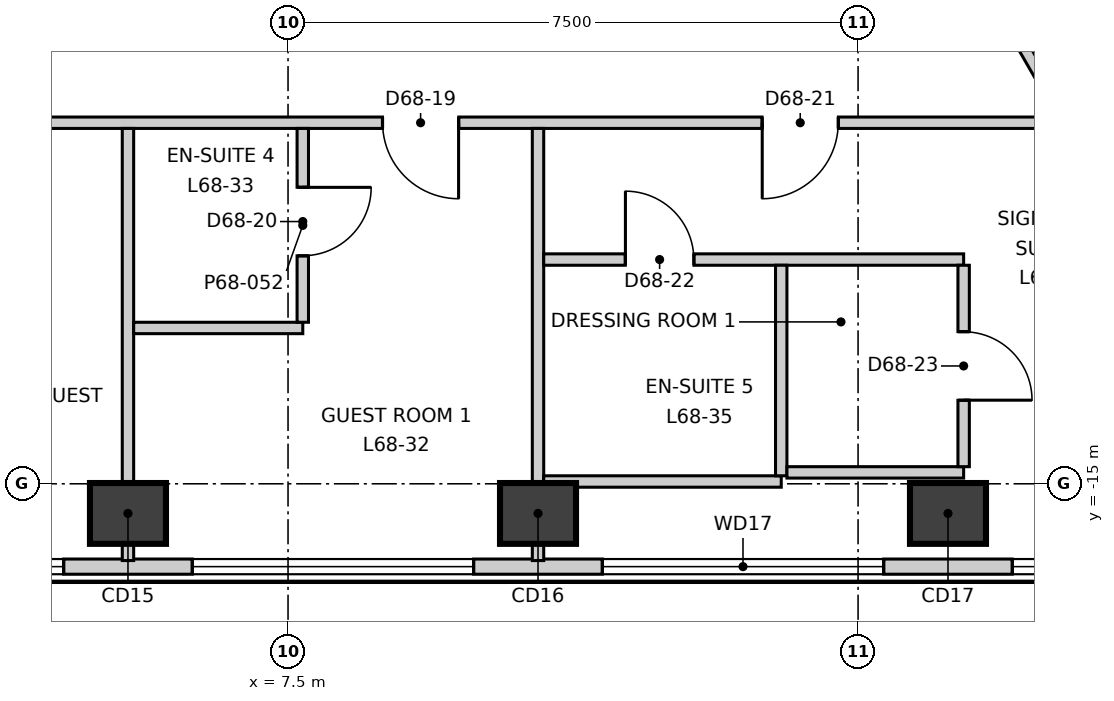
"""IFC4 building model, lengths in metres.
Left out: names, types, materials, properties, quantities, classifications, styles, units other than length and angle.
Written with IfcOpenShell. Run it as: python <this file> out.ifc"""

import sys

from ifc_helpers import new_model, si_unit, direction, frame, frame_2d, origin, origin_2d, place, context, subcontext, project, spatial, rectangle, extrude, element, fill, save


model = new_model("IFC4")
c1 = context("Model", 3, precision=1e-05, world=origin(), true_north=direction((0.0, 1.0)))
c2 = subcontext(c1, "Body", "Model", "MODEL_VIEW")
j1 = project(units=[si_unit("LENGTHUNIT", "METRE"), si_unit("PLANEANGLEUNIT", "RADIAN")], contexts=[c1])
p1 = place(None, origin())
s1 = spatial("IfcSite", under=j1, at=p1, CompositionType="ELEMENT")
p2 = place(p1, origin())
s2 = spatial("IfcBuilding", under=s1, at=p2, CompositionType="ELEMENT")
p3 = place(p2, frame((0.0, 0.0, 289.9)))
s3 = spatial("IfcBuildingStorey", under=s2, at=p3, CompositionType="ELEMENT", Elevation=289.9)
for number, where, z_axis, x_axis in (
    (1, (5.394, -15.39, -0.3), (0.0, 0.0, 1.0), (1.0, 0.0, 0.0)),
    (2, (10.789, -15.39, -0.3), (0.0, 0.0, 1.0), (1.0, 0.0, 0.0)),
    (3, (16.183, -15.39, -0.3), (0.0, 0.0, 1.0), (1.0, 0.0, 0.0)),
):
    element("IfcColumn", number, at=place(p3, frame(where, z_axis=z_axis, x_axis=x_axis)), inside=s3, PredefinedType="COLUMN", context=c2, shape_type="SweptSolid", body=[
        extrude(rectangle(XDim=1.0, YDim=0.8, at=origin_2d()), origin(), (0.0, 0.0, 1.0), 3.6),
    ])
p4 = place(p3, frame((-22.88, -16.09, 0.0), z_axis=(0.0, 0.0, 1.0), x_axis=(1.0, 0.0, 0.0)))
e4 = element("IfcWall", 4, at=p4, inside=s3, PredefinedType="ELEMENTEDWALL", context=c2, shape_type="SweptSolid", body=[
    extrude(rectangle(XDim=45.74, YDim=0.2, at=frame_2d((22.87, 0.0))), origin(), (0.0, 0.0, 1.0), 3.3),
])
p5 = place(p4, frame((2.15, 0.0, 0.9)))
e5 = element("IfcOpeningElement", 5, at=p5, cuts=e4, PredefinedType="OPENING", context=c2, shape_type="SweptSolid", body=[
    extrude(rectangle(XDim=3.7, YDim=2.2, at=frame_2d((1.85, 1.1))), frame((0.0, 0.11, 0.0), z_axis=(0.0, -1.0, 0.0), x_axis=(1.0, 0.0, 0.0)), (0.0, 0.0, 1.0), 0.22),
])
p6 = place(p4, frame((7.544, 0.0, 0.9)))
e6 = element("IfcOpeningElement", 6, at=p6, cuts=e4, PredefinedType="OPENING", context=c2, shape_type="SweptSolid", body=[
    extrude(rectangle(XDim=3.7, YDim=2.2, at=frame_2d((1.85, 1.1))), frame((0.0, 0.11, 0.0), z_axis=(0.0, -1.0, 0.0), x_axis=(1.0, 0.0, 0.0)), (0.0, 0.0, 1.0), 0.22),
])
p7 = place(p4, frame((12.939, 0.0, 0.9)))
e7 = element("IfcOpeningElement", 7, at=p7, cuts=e4, PredefinedType="OPENING", context=c2, shape_type="SweptSolid", body=[
    extrude(rectangle(XDim=3.7, YDim=2.2, at=frame_2d((1.85, 1.1))), frame((0.0, 0.11, 0.0), z_axis=(0.0, -1.0, 0.0), x_axis=(1.0, 0.0, 0.0)), (0.0, 0.0, 1.0), 0.22),
])
p8 = place(p4, frame((18.333, 0.0, 0.9)))
e8 = element("IfcOpeningElement", 8, at=p8, cuts=e4, PredefinedType="OPENING", context=c2, shape_type="SweptSolid", body=[
    extrude(rectangle(XDim=3.7, YDim=2.2, at=frame_2d((1.85, 1.1))), frame((0.0, 0.11, 0.0), z_axis=(0.0, -1.0, 0.0), x_axis=(1.0, 0.0, 0.0)), (0.0, 0.0, 1.0), 0.22),
])
p9 = place(p4, frame((23.727, 0.0, 0.9)))
e9 = element("IfcOpeningElement", 9, at=p9, cuts=e4, PredefinedType="OPENING", context=c2, shape_type="SweptSolid", body=[
    extrude(rectangle(XDim=3.7, YDim=2.2, at=frame_2d((1.85, 1.1))), frame((0.0, 0.11, 0.0), z_axis=(0.0, -1.0, 0.0), x_axis=(1.0, 0.0, 0.0)), (0.0, 0.0, 1.0), 0.22),
])
p10 = place(p4, frame((29.121, 0.0, 0.9)))
e10 = element("IfcOpeningElement", 10, at=p10, cuts=e4, PredefinedType="OPENING", context=c2, shape_type="SweptSolid", body=[
    extrude(rectangle(XDim=3.7, YDim=2.2, at=frame_2d((1.85, 1.1))), frame((0.0, 0.11, 0.0), z_axis=(0.0, -1.0, 0.0), x_axis=(1.0, 0.0, 0.0)), (0.0, 0.0, 1.0), 0.22),
])
p11 = place(p4, frame((34.516, 0.0, 0.9)))
e11 = element("IfcOpeningElement", 11, at=p11, cuts=e4, PredefinedType="OPENING", context=c2, shape_type="SweptSolid", body=[
    extrude(rectangle(XDim=3.7, YDim=2.2, at=frame_2d((1.85, 1.1))), frame((0.0, 0.11, 0.0), z_axis=(0.0, -1.0, 0.0), x_axis=(1.0, 0.0, 0.0)), (0.0, 0.0, 1.0), 0.22),
])
p12 = place(p4, frame((39.91, 0.0, 0.9)))
e12 = element("IfcOpeningElement", 12, at=p12, cuts=e4, PredefinedType="OPENING", context=c2, shape_type="SweptSolid", body=[
    extrude(rectangle(XDim=3.7, YDim=2.2, at=frame_2d((1.85, 1.1))), frame((0.0, 0.11, 0.0), z_axis=(0.0, -1.0, 0.0), x_axis=(1.0, 0.0, 0.0)), (0.0, 0.0, 1.0), 0.22),
])
p13 = place(p3, frame((25.375, -11.77, 0.0), z_axis=(0.0, 0.0, 1.0), x_axis=(-0.500008134474, 0.866020707292, 0.0)))
e13 = element("IfcWall", 13, at=p13, inside=s3, PredefinedType="ELEMENTEDWALL", context=c2, shape_type="SweptSolid", body=[
    extrude(rectangle(XDim=45.741, YDim=0.2, at=frame_2d((22.871, 0.0))), origin(), (0.0, 0.0, 1.0), 3.3),
])
p14 = place(p13, frame((2.15, 0.0, 0.9)))
e14 = element("IfcOpeningElement", 14, at=p14, cuts=e13, PredefinedType="OPENING", context=c2, shape_type="SweptSolid", body=[
    extrude(rectangle(XDim=3.7, YDim=2.2, at=frame_2d((1.85, 1.1))), frame((0.0, 0.11, 0.0), z_axis=(0.0, -1.0, 0.0), x_axis=(1.0, 0.0, 0.0)), (0.0, 0.0, 1.0), 0.22),
])
p15 = place(p13, frame((7.544, 0.0, 0.9)))
e15 = element("IfcOpeningElement", 15, at=p15, cuts=e13, PredefinedType="OPENING", context=c2, shape_type="SweptSolid", body=[
    extrude(rectangle(XDim=3.7, YDim=2.2, at=frame_2d((1.85, 1.1))), frame((0.0, 0.11, 0.0), z_axis=(0.0, -1.0, 0.0), x_axis=(1.0, 0.0, 0.0)), (0.0, 0.0, 1.0), 0.22),
])
p16 = place(p13, frame((12.939, 0.0, 0.9)))
e16 = element("IfcOpeningElement", 16, at=p16, cuts=e13, PredefinedType="OPENING", context=c2, shape_type="SweptSolid", body=[
    extrude(rectangle(XDim=3.7, YDim=2.2, at=frame_2d((1.85, 1.1))), frame((0.0, 0.11, 0.0), z_axis=(0.0, -1.0, 0.0), x_axis=(1.0, 0.0, 0.0)), (0.0, 0.0, 1.0), 0.22),
])
p17 = place(p13, frame((18.333, 0.0, 0.9)))
e17 = element("IfcOpeningElement", 17, at=p17, cuts=e13, PredefinedType="OPENING", context=c2, shape_type="SweptSolid", body=[
    extrude(rectangle(XDim=3.7, YDim=2.2, at=frame_2d((1.85, 1.1))), frame((0.0, 0.11, 0.0), z_axis=(0.0, -1.0, 0.0), x_axis=(1.0, 0.0, 0.0)), (0.0, 0.0, 1.0), 0.22),
])
p18 = place(p13, frame((23.728, 0.0, 0.9)))
e18 = element("IfcOpeningElement", 18, at=p18, cuts=e13, PredefinedType="OPENING", context=c2, shape_type="SweptSolid", body=[
    extrude(rectangle(XDim=3.7, YDim=2.2, at=frame_2d((1.85, 1.1))), frame((0.0, 0.11, 0.0), z_axis=(0.0, -1.0, 0.0), x_axis=(1.0, 0.0, 0.0)), (0.0, 0.0, 1.0), 0.22),
])
p19 = place(p13, frame((29.122, 0.0, 0.9)))
e19 = element("IfcOpeningElement", 19, at=p19, cuts=e13, PredefinedType="OPENING", context=c2, shape_type="SweptSolid", body=[
    extrude(rectangle(XDim=3.7, YDim=2.2, at=frame_2d((1.85, 1.1))), frame((0.0, 0.11, 0.0), z_axis=(0.0, -1.0, 0.0), x_axis=(1.0, 0.0, 0.0)), (0.0, 0.0, 1.0), 0.22),
])
p20 = place(p13, frame((34.517, 0.0, 0.9)))
e20 = element("IfcOpeningElement", 20, at=p20, cuts=e13, PredefinedType="OPENING", context=c2, shape_type="SweptSolid", body=[
    extrude(rectangle(XDim=3.7, YDim=2.2, at=frame_2d((1.85, 1.1))), frame((0.0, 0.11, 0.0), z_axis=(0.0, -1.0, 0.0), x_axis=(1.0, 0.0, 0.0)), (0.0, 0.0, 1.0), 0.22),
])
p21 = place(p13, frame((39.911, 0.0, 0.9)))
e21 = element("IfcOpeningElement", 21, at=p21, cuts=e13, PredefinedType="OPENING", context=c2, shape_type="SweptSolid", body=[
    extrude(rectangle(XDim=3.7, YDim=2.2, at=frame_2d((1.85, 1.1))), frame((0.0, 0.11, 0.0), z_axis=(0.0, -1.0, 0.0), x_axis=(1.0, 0.0, 0.0)), (0.0, 0.0, 1.0), 0.22),
])
p22 = place(p3, frame((-17.603, -10.25, 0.0), z_axis=(0.0, 0.0, 1.0), x_axis=(1.0, 0.0, 0.0)))
e22 = element("IfcWall", 22, at=p22, inside=s3, PredefinedType="PARTITIONING", context=c2, shape_type="SweptSolid", body=[
    extrude(rectangle(XDim=35.356, YDim=0.15, at=frame_2d((17.678, 0.0))), origin(), (0.0, 0.0, 1.0), 3.3),
])
p23 = place(p22, frame((2.8, 0.0, 0.0)))
e23 = element("IfcOpeningElement", 23, at=p23, cuts=e22, PredefinedType="OPENING", context=c2, shape_type="SweptSolid", body=[
    extrude(rectangle(XDim=1.0, YDim=2.1, at=frame_2d((0.5, 1.05))), frame((0.0, 0.085, 0.0), z_axis=(0.0, -1.0, 0.0), x_axis=(1.0, 0.0, 0.0)), (0.0, 0.0, 1.0), 0.17),
])
p24 = place(p22, frame((15.065, 0.0, 0.0)))
e24 = element("IfcOpeningElement", 24, at=p24, cuts=e22, PredefinedType="OPENING", context=c2, shape_type="SweptSolid", body=[
    extrude(rectangle(XDim=1.0, YDim=2.1, at=frame_2d((0.5, 1.05))), frame((0.0, 0.085, 0.0), z_axis=(0.0, -1.0, 0.0), x_axis=(1.0, 0.0, 0.0)), (0.0, 0.0, 1.0), 0.17),
])
p25 = place(p22, frame((9.765, 0.0, 0.0)))
e25 = element("IfcOpeningElement", 25, at=p25, cuts=e22, PredefinedType="OPENING", context=c2, shape_type="SweptSolid", body=[
    extrude(rectangle(XDim=0.9, YDim=2.1, at=frame_2d((0.45, 1.05))), frame((0.0, 0.085, 0.0), z_axis=(0.0, -1.0, 0.0), x_axis=(1.0, 0.0, 0.0)), (0.0, 0.0, 1.0), 0.17),
])
p26 = place(p22, frame((11.965, 0.0, 0.0)))
e26 = element("IfcOpeningElement", 26, at=p26, cuts=e22, PredefinedType="OPENING", context=c2, shape_type="SweptSolid", body=[
    extrude(rectangle(XDim=0.9, YDim=2.1, at=frame_2d((0.45, 1.05))), frame((0.0, 0.085, 0.0), z_axis=(0.0, -1.0, 0.0), x_axis=(1.0, 0.0, 0.0)), (0.0, 0.0, 1.0), 0.17),
])
p27 = place(p22, frame((20.953, 0.0, 0.0)))
e27 = element("IfcOpeningElement", 27, at=p27, cuts=e22, PredefinedType="OPENING", context=c2, shape_type="SweptSolid", body=[
    extrude(rectangle(XDim=1.0, YDim=2.1, at=frame_2d((0.5, 1.05))), frame((0.0, 0.085, 0.0), z_axis=(0.0, -1.0, 0.0), x_axis=(1.0, 0.0, 0.0)), (0.0, 0.0, 1.0), 0.17),
])
p28 = place(p22, frame((26.347, 0.0, 0.0)))
e28 = element("IfcOpeningElement", 28, at=p28, cuts=e22, PredefinedType="OPENING", context=c2, shape_type="SweptSolid", body=[
    extrude(rectangle(XDim=1.0, YDim=2.1, at=frame_2d((0.5, 1.05))), frame((0.0, 0.085, 0.0), z_axis=(0.0, -1.0, 0.0), x_axis=(1.0, 0.0, 0.0)), (0.0, 0.0, 1.0), 0.17),
])
p29 = place(p22, frame((31.342, 0.0, 0.0)))
e29 = element("IfcOpeningElement", 29, at=p29, cuts=e22, PredefinedType="OPENING", context=c2, shape_type="SweptSolid", body=[
    extrude(rectangle(XDim=1.0, YDim=2.1, at=frame_2d((0.5, 1.05))), frame((0.0, 0.085, 0.0), z_axis=(0.0, -1.0, 0.0), x_axis=(1.0, 0.0, 0.0)), (0.0, 0.0, 1.0), 0.17),
])
p30 = place(p3, frame((0.075, 20.37, 0.0), z_axis=(0.0, 0.0, 1.0), x_axis=(0.500009775255, -0.866019759965, 0.0)))
e30 = element("IfcWall", 30, at=p30, inside=s3, PredefinedType="PARTITIONING", context=c2, shape_type="SweptSolid", body=[
    extrude(rectangle(XDim=35.207, YDim=0.15, at=frame_2d((17.604, 0.0))), origin(), (0.0, 0.0, 1.0), 3.3),
])
p31 = place(p30, frame((31.407, 0.0, 0.0)))
e31 = element("IfcOpeningElement", 31, at=p31, cuts=e30, PredefinedType="OPENING", context=c2, shape_type="SweptSolid", body=[
    extrude(rectangle(XDim=1.0, YDim=2.1, at=frame_2d((0.5, 1.05))), frame((0.0, 0.085, 0.0), z_axis=(0.0, -1.0, 0.0), x_axis=(1.0, 0.0, 0.0)), (0.0, 0.0, 1.0), 0.17),
])
p32 = place(p30, frame((19.243, 0.0, 0.0)))
e32 = element("IfcOpeningElement", 32, at=p32, cuts=e30, PredefinedType="OPENING", context=c2, shape_type="SweptSolid", body=[
    extrude(rectangle(XDim=1.0, YDim=2.1, at=frame_2d((0.5, 1.05))), frame((0.0, 0.085, 0.0), z_axis=(0.0, -1.0, 0.0), x_axis=(1.0, 0.0, 0.0)), (0.0, 0.0, 1.0), 0.17),
])
p33 = place(p30, frame((24.543, 0.0, 0.0)))
e33 = element("IfcOpeningElement", 33, at=p33, cuts=e30, PredefinedType="OPENING", context=c2, shape_type="SweptSolid", body=[
    extrude(rectangle(XDim=0.9, YDim=2.1, at=frame_2d((0.45, 1.05))), frame((0.0, 0.085, 0.0), z_axis=(0.0, -1.0, 0.0), x_axis=(1.0, 0.0, 0.0)), (0.0, 0.0, 1.0), 0.17),
])
p34 = place(p30, frame((22.443, 0.0, 0.0)))
e34 = element("IfcOpeningElement", 34, at=p34, cuts=e30, PredefinedType="OPENING", context=c2, shape_type="SweptSolid", body=[
    extrude(rectangle(XDim=0.9, YDim=2.1, at=frame_2d((0.45, 1.05))), frame((0.0, 0.085, 0.0), z_axis=(0.0, -1.0, 0.0), x_axis=(1.0, 0.0, 0.0)), (0.0, 0.0, 1.0), 0.17),
])
p35 = place(p30, frame((13.253, 0.0, 0.0)))
e35 = element("IfcOpeningElement", 35, at=p35, cuts=e30, PredefinedType="OPENING", context=c2, shape_type="SweptSolid", body=[
    extrude(rectangle(XDim=1.0, YDim=2.1, at=frame_2d((0.5, 1.05))), frame((0.0, 0.085, 0.0), z_axis=(0.0, -1.0, 0.0), x_axis=(1.0, 0.0, 0.0)), (0.0, 0.0, 1.0), 0.17),
])
p36 = place(p30, frame((5.559, 0.0, 0.0)))
e36 = element("IfcOpeningElement", 36, at=p36, cuts=e30, PredefinedType="OPENING", context=c2, shape_type="SweptSolid", body=[
    extrude(rectangle(XDim=1.0, YDim=2.1, at=frame_2d((0.5, 1.05))), frame((0.0, 0.085, 0.0), z_axis=(0.0, -1.0, 0.0), x_axis=(1.0, 0.0, 0.0)), (0.0, 0.0, 1.0), 0.17),
])
for number, where, z_axis, x_axis in (
    (37, (5.394, -16.01, 0.0), (0.0, 0.0, 1.0), (0.0, 1.0, 0.0)),
    (38, (10.789, -16.01, 0.0), (0.0, 0.0, 1.0), (0.0, 1.0, 0.0)),
):
    element("IfcWall", number, at=place(p3, frame(where, z_axis=z_axis, x_axis=x_axis)), inside=s3, PredefinedType="PARTITIONING", context=c2, shape_type="SweptSolid", body=[
        extrude(rectangle(XDim=5.685, YDim=0.15, at=frame_2d((2.843, 0.0))), origin(), (0.0, 0.0, 1.0), 3.3),
    ])
p37 = place(p3, frame((10.864, -12.05, 0.0), z_axis=(0.0, 0.0, 1.0), x_axis=(1.0, 0.0, 0.0)))
e39 = element("IfcWall", 39, at=p37, inside=s3, PredefinedType="PARTITIONING", context=c2, shape_type="SweptSolid", body=[
    extrude(rectangle(XDim=5.525, YDim=0.15, at=frame_2d((2.762, 0.0))), origin(), (0.0, 0.0, 1.0), 3.3),
])
p38 = place(p37, frame((1.075, 0.0, 0.0)))
e40 = element("IfcOpeningElement", 40, at=p38, cuts=e39, PredefinedType="OPENING", context=c2, shape_type="SweptSolid", body=[
    extrude(rectangle(XDim=0.9, YDim=2.1, at=frame_2d((0.45, 1.05))), frame((0.0, 0.085, 0.0), z_axis=(0.0, -1.0, 0.0), x_axis=(1.0, 0.0, 0.0)), (0.0, 0.0, 1.0), 0.17),
])
p39 = place(p3, frame((10.864, -14.97, 0.0), z_axis=(0.0, 0.0, 1.0), x_axis=(1.0, 0.0, 0.0)))
e41 = element("IfcWall", 41, at=p39, inside=s3, PredefinedType="PARTITIONING", context=c2, shape_type="SweptSolid", body=[
    extrude(rectangle(XDim=3.125, YDim=0.15, at=frame_2d((1.562, 0.0))), origin(), (0.0, 0.0, 1.0), 2.6),
])
p40 = place(p3, frame((5.469, -12.95, 0.0), z_axis=(0.0, 0.0, 1.0), x_axis=(1.0, 0.0, 0.0)))
e42 = element("IfcWall", 42, at=p40, inside=s3, PredefinedType="PARTITIONING", context=c2, shape_type="SweptSolid", body=[
    extrude(rectangle(XDim=2.225, YDim=0.15, at=frame_2d((1.113, 0.0))), origin(), (0.0, 0.0, 1.0), 3.3),
])
p41 = place(p3, frame((7.694, -12.875, 0.0), z_axis=(0.0, 0.0, 1.0), x_axis=(0.0, 1.0, 0.0)))
e43 = element("IfcWall", 43, at=p41, inside=s3, PredefinedType="PARTITIONING", context=c2, shape_type="SweptSolid", body=[
    extrude(rectangle(XDim=2.55, YDim=0.15, at=frame_2d((1.275, 0.0))), origin(), (0.0, 0.0, 1.0), 3.3),
])
p42 = place(p41, frame((0.875, 0.0, 0.0)))
e44 = element("IfcOpeningElement", 44, at=p42, cuts=e43, PredefinedType="OPENING", context=c2, shape_type="SweptSolid", body=[
    extrude(rectangle(XDim=0.9, YDim=2.1, at=frame_2d((0.45, 1.05))), frame((0.0, 0.085, 0.0), z_axis=(0.0, -1.0, 0.0), x_axis=(1.0, 0.0, 0.0)), (0.0, 0.0, 1.0), 0.17),
])
p43 = place(p3, frame((13.989, -14.895, 0.0), z_axis=(0.0, 0.0, 1.0), x_axis=(0.0, 1.0, 0.0)))
e45 = element("IfcWall", 45, at=p43, inside=s3, PredefinedType="PARTITIONING", context=c2, shape_type="SweptSolid", body=[
    extrude(rectangle(XDim=2.77, YDim=0.15, at=frame_2d((1.385, 0.0))), origin(), (0.0, 0.0, 1.0), 3.3),
])
p44 = place(p3, frame((14.064, -14.85, 0.0), z_axis=(0.0, 0.0, 1.0), x_axis=(1.0, 0.0, 0.0)))
e46 = element("IfcWall", 46, at=p44, inside=s3, PredefinedType="PARTITIONING", context=c2, shape_type="SweptSolid", body=[
    extrude(rectangle(XDim=2.325, YDim=0.15, at=frame_2d((1.163, 0.0))), origin(), (0.0, 0.0, 1.0), 3.3),
])
p45 = place(p3, frame((16.389, -14.775, 0.0), z_axis=(0.0, 0.0, 1.0), x_axis=(0.0, 1.0, 0.0)))
e47 = element("IfcWall", 47, at=p45, inside=s3, PredefinedType="PARTITIONING", context=c2, shape_type="SweptSolid", body=[
    extrude(rectangle(XDim=2.65, YDim=0.15, at=frame_2d((1.325, 0.0))), origin(), (0.0, 0.0, 1.0), 3.3),
])
p46 = place(p45, frame((0.875, 0.0, 0.0)))
e48 = element("IfcOpeningElement", 48, at=p46, cuts=e47, PredefinedType="OPENING", context=c2, shape_type="SweptSolid", body=[
    extrude(rectangle(XDim=0.9, YDim=2.1, at=frame_2d((0.45, 1.05))), frame((0.0, 0.085, 0.0), z_axis=(0.0, -1.0, 0.0), x_axis=(1.0, 0.0, 0.0)), (0.0, 0.0, 1.0), 0.17),
])
p47 = place(p9, origin())
e49 = element("IfcWindow", 49, at=p47, inside=s3, PartitioningType="SINGLE_PANEL", PredefinedType="WINDOW", context=c2, shape_type="SweptSolid", body=[
    extrude(rectangle(XDim=3.7, YDim=2.2, at=frame_2d((1.85, 1.1))), frame((0.0, 0.03, 0.0), z_axis=(0.0, -1.0, 0.0), x_axis=(1.0, 0.0, 0.0)), (0.0, 0.0, 1.0), 0.06),
])
fill(e9, e49)
p48 = place(p10, origin())
e50 = element("IfcWindow", 50, at=p48, inside=s3, PartitioningType="SINGLE_PANEL", PredefinedType="WINDOW", context=c2, shape_type="SweptSolid", body=[
    extrude(rectangle(XDim=3.7, YDim=2.2, at=frame_2d((1.85, 1.1))), frame((0.0, 0.03, 0.0), z_axis=(0.0, -1.0, 0.0), x_axis=(1.0, 0.0, 0.0)), (0.0, 0.0, 1.0), 0.06),
])
fill(e10, e50)
p49 = place(p11, origin())
e51 = element("IfcWindow", 51, at=p49, inside=s3, PartitioningType="SINGLE_PANEL", PredefinedType="WINDOW", context=c2, shape_type="SweptSolid", body=[
    extrude(rectangle(XDim=3.7, YDim=2.2, at=frame_2d((1.85, 1.1))), frame((0.0, 0.03, 0.0), z_axis=(0.0, -1.0, 0.0), x_axis=(1.0, 0.0, 0.0)), (0.0, 0.0, 1.0), 0.06),
])
fill(e11, e51)
p50 = place(p12, origin())
e52 = element("IfcWindow", 52, at=p50, inside=s3, PartitioningType="SINGLE_PANEL", PredefinedType="WINDOW", context=c2, shape_type="SweptSolid", body=[
    extrude(rectangle(XDim=3.7, YDim=2.2, at=frame_2d((1.85, 1.1))), frame((0.0, 0.03, 0.0), z_axis=(0.0, -1.0, 0.0), x_axis=(1.0, 0.0, 0.0)), (0.0, 0.0, 1.0), 0.06),
])
fill(e12, e52)
p51 = place(p28, origin())
e53 = element("IfcDoor", 53, at=p51, inside=s3, OperationType="SINGLE_SWING_RIGHT", PredefinedType="DOOR", context=c2, shape_type="SweptSolid", body=[
    extrude(rectangle(XDim=1.0, YDim=2.1, at=frame_2d((0.5, 1.05))), frame((0.0, 0.025, 0.0), z_axis=(0.0, -1.0, 0.0), x_axis=(1.0, 0.0, 0.0)), (0.0, 0.0, 1.0), 0.05),
])
fill(e28, e53)
p52 = place(p42, origin())
e54 = element("IfcDoor", 54, at=p52, inside=s3, OperationType="SINGLE_SWING_RIGHT", PredefinedType="DOOR", context=c2, shape_type="SweptSolid", body=[
    extrude(rectangle(XDim=0.9, YDim=2.1, at=frame_2d((0.45, 1.05))), frame((0.0, 0.025, 0.0), z_axis=(0.0, -1.0, 0.0), x_axis=(1.0, 0.0, 0.0)), (0.0, 0.0, 1.0), 0.05),
])
fill(e44, e54)
p53 = place(p29, origin())
e55 = element("IfcDoor", 55, at=p53, inside=s3, OperationType="SINGLE_SWING_LEFT", PredefinedType="DOOR", context=c2, shape_type="SweptSolid", body=[
    extrude(rectangle(XDim=1.0, YDim=2.1, at=frame_2d((0.5, 1.05))), frame((0.0, 0.025, 0.0), z_axis=(0.0, -1.0, 0.0), x_axis=(1.0, 0.0, 0.0)), (0.0, 0.0, 1.0), 0.05),
])
fill(e29, e55)
p54 = place(p38, origin())
e56 = element("IfcDoor", 56, at=p54, inside=s3, OperationType="SINGLE_SWING_RIGHT", PredefinedType="DOOR", context=c2, shape_type="SweptSolid", body=[
    extrude(rectangle(XDim=0.9, YDim=2.1, at=frame_2d((0.45, 1.05))), frame((0.0, 0.025, 0.0), z_axis=(0.0, -1.0, 0.0), x_axis=(1.0, 0.0, 0.0)), (0.0, 0.0, 1.0), 0.05),
])
fill(e40, e56)
p55 = place(p46, origin())
e57 = element("IfcDoor", 57, at=p55, inside=s3, OperationType="SINGLE_SWING_LEFT", PredefinedType="DOOR", context=c2, shape_type="SweptSolid", body=[
    extrude(rectangle(XDim=0.9, YDim=2.1, at=frame_2d((0.45, 1.05))), frame((0.0, 0.025, 0.0), z_axis=(0.0, -1.0, 0.0), x_axis=(1.0, 0.0, 0.0)), (0.0, 0.0, 1.0), 0.05),
])
fill(e48, e57)
save(model, sys.argv[1])
